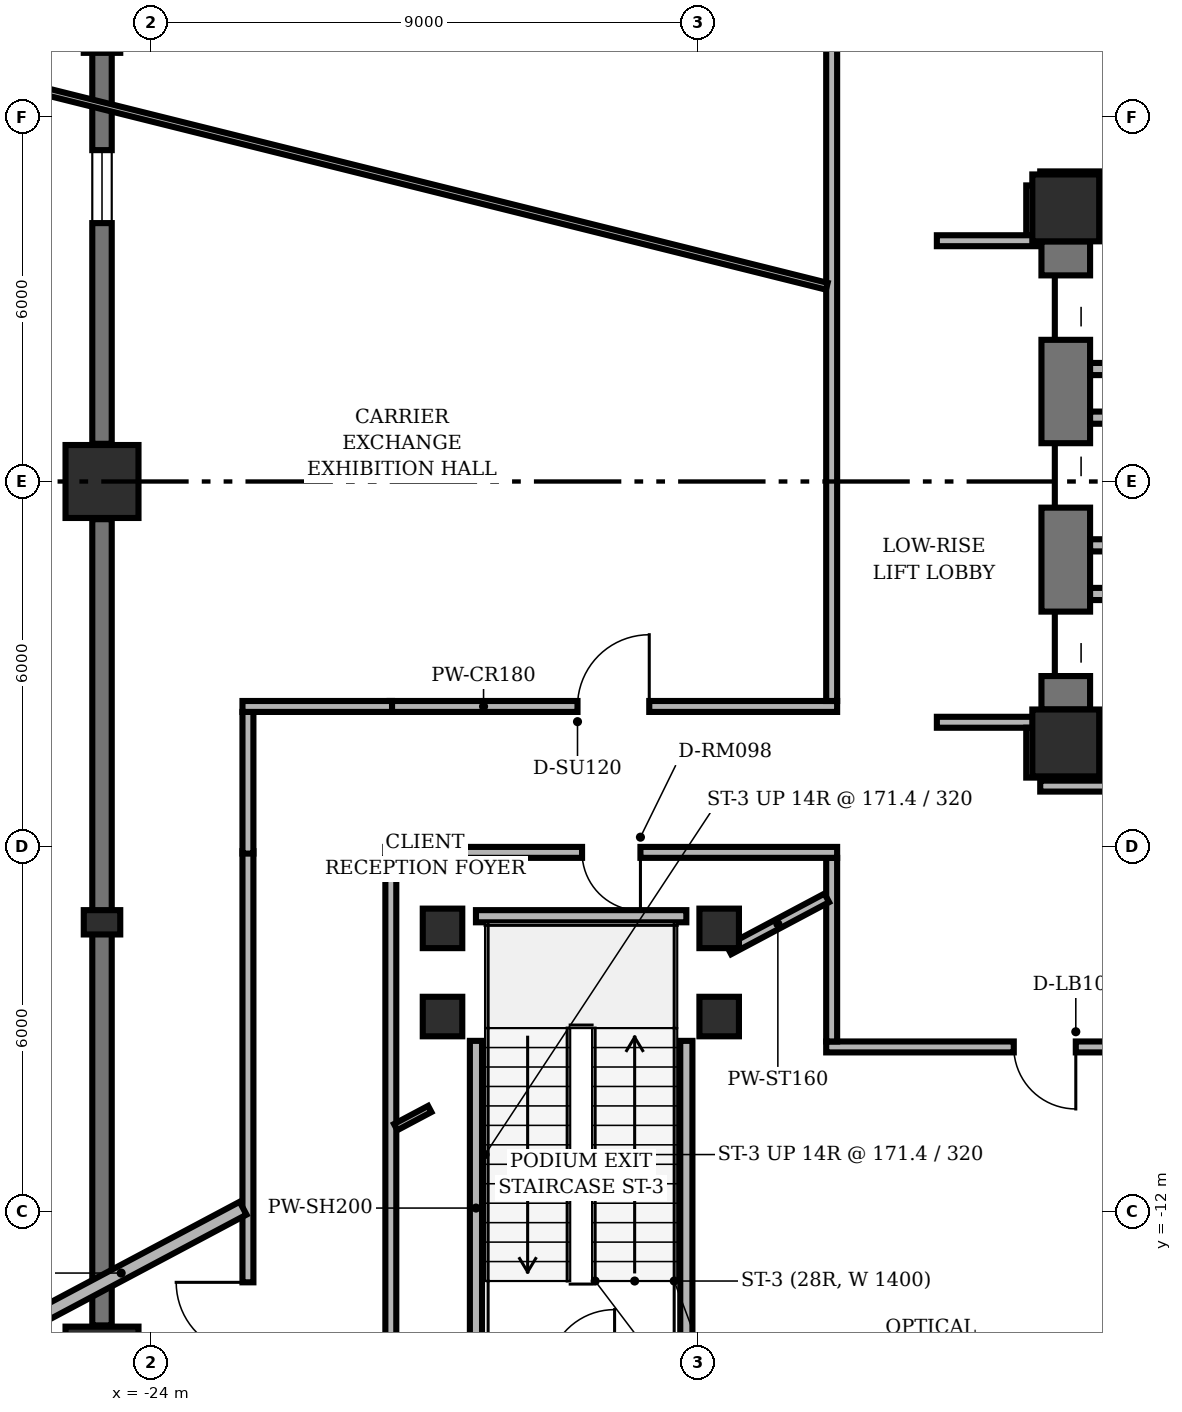
"""IFC4 building model, lengths in metres.
Left out: names, types, materials, properties, quantities, classifications, styles, units other than length and angle.
Written with IfcOpenShell. Run it as: python <this file> out.ifc"""

import sys

from ifc_helpers import new_model, si_unit, direction, frame, frame_2d, origin, origin_2d, place, context, subcontext, project, spatial, rectangle, hollow_rectangle, extrude, element, fill, save


model = new_model("IFC4")
c1 = context("Model", 3, precision=1e-05, world=origin(), true_north=direction((0.0, 1.0)))
c2 = subcontext(c1, "Body", "Model", "MODEL_VIEW")
j1 = project(units=[si_unit("LENGTHUNIT", "METRE"), si_unit("PLANEANGLEUNIT", "RADIAN")], contexts=[c1])
p1 = place(None, origin())
s1 = spatial("IfcSite", under=j1, at=p1, CompositionType="ELEMENT")
p2 = place(p1, origin())
s2 = spatial("IfcBuilding", under=s1, at=p2, CompositionType="ELEMENT")
p3 = place(p2, origin())
s3 = spatial("IfcBuildingStorey", under=s2, at=p3, CompositionType="ELEMENT", Elevation=0.0)
for number, where, z_axis, x_axis in (
    (1, (-8.95, 4.5, 0.0), (0.0, 0.0, 1.0), (1.0, 0.0, 0.0)),
    (2, (-8.95, -4.3, 0.0), (0.0, 0.0, 1.0), (1.0, 0.0, 0.0)),
):
    element("IfcColumn", number, at=place(p3, frame(where, z_axis=z_axis, x_axis=x_axis)), inside=s3, PredefinedType="COLUMN", context=c2, shape_type="SweptSolid", body=[
        extrude(hollow_rectangle(XDim=1.1, YDim=1.1, WallThickness=0.07, InnerFilletRadius=0.02, OuterFilletRadius=0.04, at=origin_2d()), origin(), (0.0, 0.0, 1.0), 4.8),
    ])
p4 = place(p3, frame((-8.95, -3.75, 0.0), z_axis=(0.0, 0.0, 1.0), x_axis=(0.0, 1.0, 0.0)))
e3 = element("IfcWall", 3, at=p4, inside=s3, PredefinedType="SHEAR", context=c2, shape_type="SweptSolid", body=[
    extrude(rectangle(XDim=7.7, YDim=0.8, at=frame_2d((3.85, 0.0))), origin(), (0.0, 0.0, 1.0), 4.498),
])
p5 = place(p4, frame((0.55, 0.0, 0.0)))
e4 = element("IfcOpeningElement", 4, at=p5, cuts=e3, PredefinedType="OPENING", context=c2, shape_type="SweptSolid", body=[
    extrude(rectangle(XDim=1.06, YDim=2.04, at=frame_2d((0.53, 1.02))), frame((0.0, 0.41, 0.0), z_axis=(0.0, -1.0, 0.0), x_axis=(1.0, 0.0, 0.0)), (0.0, 0.0, 1.0), 0.82),
])
p6 = place(p4, frame((3.32, 0.0, 0.0)))
e5 = element("IfcOpeningElement", 5, at=p6, cuts=e3, PredefinedType="OPENING", context=c2, shape_type="SweptSolid", body=[
    extrude(rectangle(XDim=1.06, YDim=2.04, at=frame_2d((0.53, 1.02))), frame((0.0, 0.41, 0.0), z_axis=(0.0, -1.0, 0.0), x_axis=(1.0, 0.0, 0.0)), (0.0, 0.0, 1.0), 0.82),
])
p7 = place(p4, frame((6.08, 0.0, 0.0)))
e6 = element("IfcOpeningElement", 6, at=p7, cuts=e3, PredefinedType="OPENING", context=c2, shape_type="SweptSolid", body=[
    extrude(rectangle(XDim=1.06, YDim=2.04, at=frame_2d((0.53, 1.02))), frame((0.0, 0.41, 0.0), z_axis=(0.0, -1.0, 0.0), x_axis=(1.0, 0.0, 0.0)), (0.0, 0.0, 1.0), 0.82),
])
for number, where, z_axis, x_axis in (
    (7, (-8.4, 4.5, 0.0), (0.0, 0.0, 1.0), (1.0, 0.0, 0.0)),
    (8, (-8.4, -4.3, 0.0), (0.0, 0.0, 1.0), (1.0, 0.0, 0.0)),
):
    element("IfcWall", number, at=place(p3, frame(where, z_axis=z_axis, x_axis=x_axis)), inside=s3, PredefinedType="SHEAR", context=c2, shape_type="SweptSolid", body=[
        extrude(rectangle(XDim=1.8, YDim=0.4, at=frame_2d((0.9, 0.0))), origin(), (0.0, 0.0, 1.0), 4.498),
    ])
for number, where, z_axis, x_axis in (
    (9, (-24.8, 0.0, 0.0), (0.0, 0.0, 1.0), (1.0, 0.0, 0.0)),
    (10, (-24.8, -14.5, 0.0), (0.0, 0.0, 1.0), (1.0, 0.0, 0.0)),
):
    element("IfcColumn", number, at=place(p3, frame(where, z_axis=z_axis, x_axis=x_axis)), inside=s3, PredefinedType="COLUMN", context=c2, shape_type="SweptSolid", body=[
        extrude(rectangle(XDim=1.2, YDim=1.2, at=origin_2d()), origin(), (0.0, 0.0, 1.0), 4.8),
    ])
for number, where, z_axis, x_axis in (
    (11, (-19.2, -8.8, 0.0), (0.0, 0.0, 1.0), (1.0, 0.0, 0.0)),
    (12, (-14.65, -8.8, 0.0), (0.0, 0.0, 1.0), (1.0, 0.0, 0.0)),
    (13, (-19.2, -7.35, 0.0), (0.0, 0.0, 1.0), (1.0, 0.0, 0.0)),
    (14, (-14.65, -7.35, 0.0), (0.0, 0.0, 1.0), (1.0, 0.0, 0.0)),
):
    element("IfcColumn", number, at=place(p3, frame(where, z_axis=z_axis, x_axis=x_axis)), inside=s3, PredefinedType="COLUMN", context=c2, shape_type="SweptSolid", body=[
        extrude(rectangle(XDim=0.65, YDim=0.65, at=origin_2d()), origin(), (0.0, 0.0, 1.0), 4.8),
    ])
for number, where, z_axis, x_axis in (
    (15, (-24.8, 7.25, 0.0), (0.0, 0.0, 1.0), (1.0, 0.0, 0.0)),
    (16, (-24.8, -7.25, 0.0), (0.0, 0.0, 1.0), (1.0, 0.0, 0.0)),
):
    element("IfcColumn", number, at=place(p3, frame(where, z_axis=z_axis, x_axis=x_axis)), inside=s3, PredefinedType="PILASTER", context=c2, shape_type="SweptSolid", body=[
        extrude(rectangle(XDim=0.6, YDim=0.4, at=origin_2d()), origin(), (0.0, 0.0, 1.0), 4.8),
    ])
p8 = place(p3, frame((-24.8, 0.62, 0.0), z_axis=(0.0, 0.0, 1.0), x_axis=(0.0, 1.0, 0.0)))
e17 = element("IfcWall", 17, at=p8, inside=s3, PredefinedType="SOLIDWALL", context=c2, shape_type="SweptSolid", body=[
    extrude(rectangle(XDim=13.26, YDim=0.32, at=frame_2d((6.63, 0.0))), origin(), (0.0, 0.0, 1.0), 3.541),
])
p9 = place(p8, frame((3.63, 0.0, 0.65)))
e18 = element("IfcOpeningElement", 18, at=p9, cuts=e17, PredefinedType="OPENING", context=c2, shape_type="SweptSolid", body=[
    extrude(rectangle(XDim=1.2, YDim=1.6, at=frame_2d((0.6, 0.8))), frame((0.0, 0.17, 0.0), z_axis=(0.0, -1.0, 0.0), x_axis=(1.0, 0.0, 0.0)), (0.0, 0.0, 1.0), 0.34),
])
p10 = place(p8, frame((8.43, 0.0, 0.65)))
e19 = element("IfcOpeningElement", 19, at=p10, cuts=e17, PredefinedType="OPENING", context=c2, shape_type="SweptSolid", body=[
    extrude(rectangle(XDim=1.2, YDim=1.6, at=frame_2d((0.6, 0.8))), frame((0.0, 0.17, 0.0), z_axis=(0.0, -1.0, 0.0), x_axis=(1.0, 0.0, 0.0)), (0.0, 0.0, 1.0), 0.34),
])
p11 = place(p3, frame((-24.8, -13.88, 0.0), z_axis=(0.0, 0.0, 1.0), x_axis=(0.0, 1.0, 0.0)))
e20 = element("IfcWall", 20, at=p11, inside=s3, PredefinedType="SOLIDWALL", context=c2, shape_type="SweptSolid", body=[
    extrude(rectangle(XDim=13.26, YDim=0.32, at=frame_2d((6.63, 0.0))), origin(), (0.0, 0.0, 1.0), 3.868),
])
for number, where, z_axis, x_axis in (
    (21, (-8.55, -1.85, 0.0), (0.0, 0.0, 1.0), (1.0, 0.0, 0.0)),
    (22, (-8.55, 1.85, 0.0), (0.0, 0.0, 1.0), (1.0, 0.0, 0.0)),
):
    element("IfcWall", number, at=place(p3, frame(where, z_axis=z_axis, x_axis=x_axis)), inside=s3, PredefinedType="PARTITIONING", context=c2, shape_type="SweptSolid", body=[
        extrude(rectangle(XDim=2.1, YDim=0.2, at=frame_2d((1.05, 0.0))), origin(), (0.0, 0.0, 1.0), 4.473),
    ])
for number, where, z_axis, x_axis in (
    (23, (-8.55, -1.05, 0.0), (0.0, 0.0, 1.0), (1.0, 0.0, 0.0)),
    (24, (-8.55, 1.05, 0.0), (0.0, 0.0, 1.0), (1.0, 0.0, 0.0)),
):
    element("IfcWall", number, at=place(p3, frame(where, z_axis=z_axis, x_axis=x_axis)), inside=s3, PredefinedType="PARTITIONING", context=c2, shape_type="SweptSolid", body=[
        extrude(rectangle(XDim=1.91, YDim=0.2, at=frame_2d((0.955, 0.0))), origin(), (0.0, 0.0, 1.0), 4.473),
    ])
for number, where, z_axis, x_axis in (
    (25, (-18.65, -14.7, 0.0), (0.0, 0.0, 1.0), (0.0, 1.0, 0.0)),
    (26, (-15.19, -14.7, 0.0), (0.0, 0.0, 1.0), (0.0, 1.0, 0.0)),
):
    element("IfcWall", number, at=place(p3, frame(where, z_axis=z_axis, x_axis=x_axis)), inside=s3, PredefinedType="PARTITIONING", context=c2, shape_type="SweptSolid", body=[
        extrude(rectangle(XDim=5.5, YDim=0.2, at=frame_2d((2.75, 0.0))), origin(), (0.0, 0.0, 1.0), 4.473),
    ])
p12 = place(p3, frame((-18.65, -7.15, 0.0), z_axis=(0.0, 0.0, 1.0), x_axis=(1.0, 0.0, 0.0)))
e27 = element("IfcWall", 27, at=p12, inside=s3, PredefinedType="PARTITIONING", context=c2, shape_type="SweptSolid", body=[
    extrude(rectangle(XDim=3.46, YDim=0.2, at=frame_2d((1.73, 0.0))), origin(), (0.0, 0.0, 1.0), 1.797),
])
p13 = place(p3, frame((-20.07, -3.7, 0.0), z_axis=(0.0, 0.0, 1.0), x_axis=(1.0, 0.0, 0.0)))
e28 = element("IfcWall", 28, at=p13, inside=s3, PredefinedType="PARTITIONING", context=c2, shape_type="SweptSolid", body=[
    extrude(rectangle(XDim=7.36, YDim=0.18, at=frame_2d((3.68, 0.0))), origin(), (0.0, 0.0, 1.0), 3.598),
])
p14 = place(p13, frame((3.09, 0.0, 0.0)))
e29 = element("IfcOpeningElement", 29, at=p14, cuts=e28, PredefinedType="OPENING", context=c2, shape_type="SweptSolid", body=[
    extrude(rectangle(XDim=1.18, YDim=2.02, at=frame_2d((0.59, 1.01))), frame((0.0, 0.1, 0.0), z_axis=(0.0, -1.0, 0.0), x_axis=(1.0, 0.0, 0.0)), (0.0, 0.0, 1.0), 0.2),
])
p15 = place(p3, frame((-12.8, -3.61, 0.0), z_axis=(0.0, 0.0, 1.0), x_axis=(0.0, 1.0, 0.0)))
e30 = element("IfcWall", 30, at=p15, inside=s3, PredefinedType="PARTITIONING", context=c2, shape_type="SweptSolid", body=[
    extrude(rectangle(XDim=12.82, YDim=0.18, at=frame_2d((6.41, 0.0))), origin(), (0.0, 0.0, 1.0), 4.473),
])
p16 = place(p3, frame((-6.562, 5.01, 0.0), z_axis=(0.0, 0.0, 1.0), x_axis=(-1.0, 0.0, 0.0)))
e31 = element("IfcWall", 31, at=p16, inside=s3, PredefinedType="PARTITIONING", context=c2, shape_type="SweptSolid", body=[
    extrude(rectangle(XDim=2.808, YDim=0.18, at=frame_2d((1.404, 0.0))), origin(), (0.0, 0.0, 1.0), 4.473),
])
p17 = place(p3, frame((-9.51, 4.87, 0.0), z_axis=(0.0, 0.0, 1.0), x_axis=(0.0, -1.0, 0.0)))
e32 = element("IfcWall", 32, at=p17, inside=s3, PredefinedType="PARTITIONING", context=c2, shape_type="SweptSolid", body=[
    extrude(rectangle(XDim=0.82, YDim=0.18, at=frame_2d((0.41, 0.0))), origin(), (0.0, 0.0, 1.0), 4.473),
])
p18 = place(p3, frame((-9.42, 3.96, 0.0), z_axis=(0.0, 0.0, 1.0), x_axis=(-1.0, 0.0, 0.0)))
e33 = element("IfcWall", 33, at=p18, inside=s3, PredefinedType="PARTITIONING", context=c2, shape_type="SweptSolid", body=[
    extrude(rectangle(XDim=1.65, YDim=0.18, at=frame_2d((0.825, 0.0))), origin(), (0.0, 0.0, 1.0), 4.473),
])
p19 = place(p3, frame((-11.07, -3.96, 0.0), z_axis=(0.0, 0.0, 1.0), x_axis=(1.0, 0.0, 0.0)))
e34 = element("IfcWall", 34, at=p19, inside=s3, PredefinedType="PARTITIONING", context=c2, shape_type="SweptSolid", body=[
    extrude(rectangle(XDim=1.65, YDim=0.18, at=frame_2d((0.825, 0.0))), origin(), (0.0, 0.0, 1.0), 3.598),
])
p20 = place(p3, frame((-9.51, -4.05, 0.0), z_axis=(0.0, 0.0, 1.0), x_axis=(0.0, -1.0, 0.0)))
e35 = element("IfcWall", 35, at=p20, inside=s3, PredefinedType="PARTITIONING", context=c2, shape_type="SweptSolid", body=[
    extrude(rectangle(XDim=0.82, YDim=0.18, at=frame_2d((0.41, 0.0))), origin(), (0.0, 0.0, 1.0), 4.473),
])
p21 = place(p3, frame((-9.37, -5.01, 0.0), z_axis=(0.0, 0.0, 1.0), x_axis=(1.0, 0.0, 0.0)))
e36 = element("IfcWall", 36, at=p21, inside=s3, PredefinedType="PARTITIONING", context=c2, shape_type="SweptSolid", body=[
    extrude(rectangle(XDim=3.34, YDim=0.18, at=frame_2d((1.67, 0.0))), origin(), (0.0, 0.0, 1.0), 4.473),
])
p22 = place(p3, frame((-5.7, -9.3, 0.0), z_axis=(0.0, 0.0, 1.0), x_axis=(-1.0, 0.0, 0.0)))
e37 = element("IfcWall", 37, at=p22, inside=s3, PredefinedType="PARTITIONING", context=c2, shape_type="SweptSolid", body=[
    extrude(rectangle(XDim=7.19, YDim=0.18, at=frame_2d((3.595, 0.0))), origin(), (0.0, 0.0, 1.0), 3.987),
])
p23 = place(p22, frame((3.085, 0.0, 0.0)))
e38 = element("IfcOpeningElement", 38, at=p23, cuts=e37, PredefinedType="OPENING", context=c2, shape_type="SweptSolid", body=[
    extrude(rectangle(XDim=1.02, YDim=2.02, at=frame_2d((0.51, 1.01))), frame((0.0, 0.1, 0.0), z_axis=(0.0, -1.0, 0.0), x_axis=(1.0, 0.0, 0.0)), (0.0, 0.0, 1.0), 0.2),
])
p24 = place(p3, frame((-12.8, -9.21, 0.0), z_axis=(0.0, 0.0, 1.0), x_axis=(0.0, 1.0, 0.0)))
e39 = element("IfcWall", 39, at=p24, inside=s3, PredefinedType="PARTITIONING", context=c2, shape_type="SweptSolid", body=[
    extrude(rectangle(XDim=3.02, YDim=0.18, at=frame_2d((1.51, 0.0))), origin(), (0.0, 0.0, 1.0), 4.473),
])
p25 = place(p3, frame((-12.71, -6.1, 0.0), z_axis=(0.0, 0.0, 1.0), x_axis=(-1.0, 0.0, 0.0)))
e40 = element("IfcWall", 40, at=p25, inside=s3, PredefinedType="PARTITIONING", context=c2, shape_type="SweptSolid", body=[
    extrude(rectangle(XDim=7.43, YDim=0.18, at=frame_2d((3.715, 0.0))), origin(), (0.0, 0.0, 1.0), 4.473),
])
p26 = place(p25, frame((3.235, 0.0, 0.0)))
e41 = element("IfcOpeningElement", 41, at=p26, cuts=e40, PredefinedType="OPENING", context=c2, shape_type="SweptSolid", body=[
    extrude(rectangle(XDim=0.96, YDim=2.02, at=frame_2d((0.48, 1.01))), frame((0.0, 0.1, 0.0), z_axis=(0.0, -1.0, 0.0), x_axis=(1.0, 0.0, 0.0)), (0.0, 0.0, 1.0), 0.2),
])
p27 = place(p3, frame((-20.05, -6.19, 0.0), z_axis=(0.0, 0.0, 1.0), x_axis=(0.0, -1.0, 0.0)))
e42 = element("IfcWall", 42, at=p27, inside=s3, PredefinedType="PARTITIONING", context=c2, shape_type="SweptSolid", body=[
    extrude(rectangle(XDim=9.52, YDim=0.18, at=frame_2d((4.76, 0.0))), origin(), (0.0, 0.0, 1.0), 3.526),
])
p28 = place(p3, frame((-22.4, -15.82, 0.0), z_axis=(0.0, 0.0, 1.0), x_axis=(0.0, 1.0, 0.0)))
e43 = element("IfcWall", 43, at=p28, inside=s3, PredefinedType="PARTITIONING", context=c2, shape_type="SweptSolid", body=[
    extrude(rectangle(XDim=9.74, YDim=0.18, at=frame_2d((4.87, 0.0))), origin(), (0.0, 0.0, 1.0), 4.473),
])
p29 = place(p28, frame((1.469, 0.0, 0.0)))
e44 = element("IfcOpeningElement", 44, at=p29, cuts=e43, PredefinedType="OPENING", context=c2, shape_type="SweptSolid", body=[
    extrude(rectangle(XDim=1.18, YDim=2.02, at=frame_2d((0.59, 1.01))), frame((0.0, 0.1, 0.0), z_axis=(0.0, -1.0, 0.0), x_axis=(1.0, 0.0, 0.0)), (0.0, 0.0, 1.0), 0.2),
])
p30 = place(p3, frame((-22.4, -6.12, 0.0), z_axis=(0.0, 0.0, 1.0), x_axis=(0.0, 1.0, 0.0)))
e45 = element("IfcWall", 45, at=p30, inside=s3, PredefinedType="PARTITIONING", context=c2, shape_type="SweptSolid", body=[
    extrude(rectangle(XDim=2.33, YDim=0.18, at=frame_2d((1.165, 0.0))), origin(), (0.0, 0.0, 1.0), 4.473),
])
p31 = place(p3, frame((-22.49, -3.7, 0.0), z_axis=(0.0, 0.0, 1.0), x_axis=(1.0, 0.0, 0.0)))
e46 = element("IfcWall", 46, at=p31, inside=s3, PredefinedType="PARTITIONING", context=c2, shape_type="SweptSolid", body=[
    extrude(rectangle(XDim=2.46, YDim=0.18, at=frame_2d((1.23, 0.0))), origin(), (0.0, 0.0, 1.0), 4.473),
])
p32 = place(p3, frame((-12.88, -6.848, 0.0), z_axis=(0.0, 0.0, 1.0), x_axis=(-0.882926709307, -0.469510836928, 0.0)))
e47 = element("IfcWall", 47, at=p32, inside=s3, PredefinedType="PARTITIONING", context=c2, shape_type="SweptSolid", body=[
    extrude(rectangle(XDim=1.823, YDim=0.16, at=frame_2d((0.912, 0.0))), origin(), (0.0, 0.0, 1.0), 4.473),
])
p33 = place(p3, frame((-19.41, -10.321, 0.0), z_axis=(0.0, 0.0, 1.0), x_axis=(-0.883065873803, -0.469249041049, 0.0)))
e48 = element("IfcWall", 48, at=p33, inside=s3, PredefinedType="MOVABLE", context=c2, shape_type="SweptSolid", body=[
    extrude(rectangle(XDim=0.634, YDim=0.115, at=frame_2d((0.317, 0.0))), origin(), (0.0, 0.0, 1.0), 4.473),
])
p34 = place(p3, frame((-22.48, -11.953, 0.0), z_axis=(0.0, 0.0, 1.0), x_axis=(-0.882954888604, -0.469457841228, 0.0)))
e49 = element("IfcWall", 49, at=p34, inside=s3, PredefinedType="PARTITIONING", context=c2, shape_type="SweptSolid", body=[
    extrude(rectangle(XDim=4.542, YDim=0.24, at=frame_2d((2.271, 0.0))), origin(), (0.0, 0.0, 1.0), 4.473),
])
p35 = place(p3, frame((-12.88, 3.211, 0.0), z_axis=(0.0, 0.0, 1.0), x_axis=(-0.97029281794, 0.241933560001, 0.0)))
e50 = element("IfcWall", 50, at=p35, inside=s3, PredefinedType="MOVABLE", context=c2, shape_type="SweptSolid", body=[
    extrude(rectangle(XDim=14.027, YDim=0.115, at=frame_2d((7.013, 0.0))), origin(), (0.0, 0.0, 1.0), 4.473),
])
p36 = place(p9, origin())
e51 = element("IfcWindow", 51, at=p36, inside=s3, PartitioningType="SINGLE_PANEL", PredefinedType="WINDOW", context=c2, shape_type="SweptSolid", body=[
    extrude(rectangle(XDim=1.2, YDim=1.6, at=frame_2d((0.6, 0.8))), frame((0.0, 0.03, 0.0), z_axis=(0.0, -1.0, 0.0), x_axis=(1.0, 0.0, 0.0)), (0.0, 0.0, 1.0), 0.06),
])
fill(e18, e51)
p37 = place(p5, origin())
e52 = element("IfcDoor", 52, at=p37, inside=s3, OperationType="SLIDING_TO_LEFT", PredefinedType="DOOR", context=c2, shape_type="SweptSolid", body=[
    extrude(rectangle(XDim=1.06, YDim=2.04, at=frame_2d((0.53, 1.02))), frame((0.0, 0.025, 0.0), z_axis=(0.0, -1.0, 0.0), x_axis=(1.0, 0.0, 0.0)), (0.0, 0.0, 1.0), 0.05),
])
fill(e4, e52)
p38 = place(p6, origin())
e53 = element("IfcDoor", 53, at=p38, inside=s3, OperationType="SLIDING_TO_RIGHT", PredefinedType="DOOR", context=c2, shape_type="SweptSolid", body=[
    extrude(rectangle(XDim=1.06, YDim=2.04, at=frame_2d((0.53, 1.02))), frame((0.0, 0.025, 0.0), z_axis=(0.0, -1.0, 0.0), x_axis=(1.0, 0.0, 0.0)), (0.0, 0.0, 1.0), 0.05),
])
fill(e5, e53)
p39 = place(p7, origin())
e54 = element("IfcDoor", 54, at=p39, inside=s3, OperationType="SLIDING_TO_LEFT", PredefinedType="DOOR", context=c2, shape_type="SweptSolid", body=[
    extrude(rectangle(XDim=1.06, YDim=2.04, at=frame_2d((0.53, 1.02))), frame((0.0, 0.025, 0.0), z_axis=(0.0, -1.0, 0.0), x_axis=(1.0, 0.0, 0.0)), (0.0, 0.0, 1.0), 0.05),
])
fill(e6, e54)
p40 = place(p14, origin())
e55 = element("IfcDoor", 55, at=p40, inside=s3, OperationType="SINGLE_SWING_RIGHT", PredefinedType="DOOR", context=c2, shape_type="SweptSolid", body=[
    extrude(rectangle(XDim=1.18, YDim=2.02, at=frame_2d((0.59, 1.01))), frame((0.0, 0.025, 0.0), z_axis=(0.0, -1.0, 0.0), x_axis=(1.0, 0.0, 0.0)), (0.0, 0.0, 1.0), 0.05),
])
fill(e29, e55)
p41 = place(p26, origin())
e56 = element("IfcDoor", 56, at=p41, inside=s3, OperationType="SINGLE_SWING_LEFT", PredefinedType="DOOR", context=c2, shape_type="SweptSolid", body=[
    extrude(rectangle(XDim=0.96, YDim=2.02, at=frame_2d((0.48, 1.01))), frame((0.0, 0.025, 0.0), z_axis=(0.0, -1.0, 0.0), x_axis=(1.0, 0.0, 0.0)), (0.0, 0.0, 1.0), 0.05),
])
fill(e41, e56)
p42 = place(p29, origin())
e57 = element("IfcDoor", 57, at=p42, inside=s3, OperationType="SINGLE_SWING_RIGHT", PredefinedType="DOOR", context=c2, shape_type="SweptSolid", body=[
    extrude(rectangle(XDim=1.18, YDim=2.02, at=frame_2d((0.59, 1.01))), frame((0.0, 0.025, 0.0), z_axis=(0.0, -1.0, 0.0), x_axis=(1.0, 0.0, 0.0)), (0.0, 0.0, 1.0), 0.05),
])
fill(e44, e57)
p43 = place(p23, origin())
e58 = element("IfcDoor", 58, at=p43, inside=s3, OperationType="SINGLE_SWING_LEFT", PredefinedType="DOOR", context=c2, shape_type="SweptSolid", body=[
    extrude(rectangle(XDim=1.02, YDim=2.02, at=frame_2d((0.51, 1.01))), frame((0.0, 0.025, 0.0), z_axis=(0.0, -1.0, 0.0), x_axis=(1.0, 0.0, 0.0)), (0.0, 0.0, 1.0), 0.05),
])
fill(e38, e58)
save(model, sys.argv[1])
